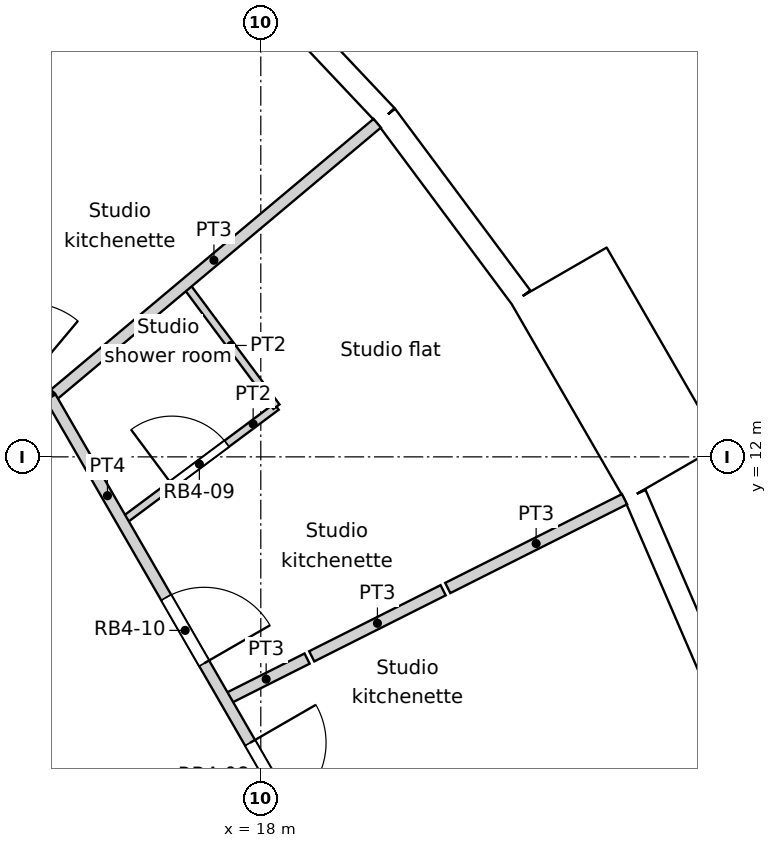
"""IFC4 building model, lengths in metres.
Left out: names, types, materials, properties, quantities, classifications, styles, units other than length and angle.
Written with IfcOpenShell. Run it as: python <this file> out.ifc"""

import sys

from ifc_helpers import new_model, si_unit, direction, frame, frame_2d, origin, origin_2d, place, context, subcontext, project, spatial, rectangle, circle, extrude, element, fill, save


model = new_model("IFC4")
c1 = context("Model", 3, precision=1e-05, world=origin(), true_north=direction((0.0, 1.0)))
c2 = subcontext(c1, "Body", "Model", "MODEL_VIEW")
j1 = project(units=[si_unit("LENGTHUNIT", "METRE"), si_unit("PLANEANGLEUNIT", "RADIAN")], contexts=[c1])
p1 = place(None, origin())
s1 = spatial("IfcSite", under=j1, at=p1, CompositionType="ELEMENT")
p2 = place(p1, origin())
s2 = spatial("IfcBuilding", under=s1, at=p2, CompositionType="ELEMENT")
p3 = place(p2, frame((0.0, 0.0, 158.4)))
s3 = spatial("IfcBuildingStorey", under=s2, at=p3, CompositionType="ELEMENT", Elevation=158.4)
for number, where, z_axis, x_axis in (
    (1, (21.937, 11.017, 0.0), (0.0, 0.0, 1.0), (1.0, 0.0, 0.0)),
    (2, (18.805, 15.779, 0.0), (0.0, 0.0, 1.0), (1.0, 0.0, 0.0)),
):
    element("IfcColumn", number, at=place(p3, frame(where, z_axis=z_axis, x_axis=x_axis)), inside=s3, PredefinedType="COLUMN", context=c2, shape_type="SweptSolid", body=[
        extrude(circle(Radius=0.6, at=origin_2d()), origin(), (0.0, 0.0, 1.0), 3.6),
    ])
p4 = place(p3, frame((15.552, 10.603, 0.0), z_axis=(0.0, 0.0, 1.0), x_axis=(1.0, 0.0, 0.0)))
e3 = element("IfcColumn", 3, at=p4, inside=s3, PredefinedType="COLUMN", context=c2, shape_type="SweptSolid", body=[
    extrude(circle(Radius=0.65, at=origin_2d()), origin(), (0.0, 0.0, 1.0), 3.6),
])
p5 = place(p3, frame((24.101, 8.772, 0.0), z_axis=(0.0, 0.0, 1.0), x_axis=(-0.396148129016, 0.918186614952, 0.0)))
e4 = element("IfcWall", 4, at=p5, inside=s3, PredefinedType="SOLIDWALL", context=c2, shape_type="SweptSolid", body=[
    extrude(rectangle(XDim=2.973, YDim=0.3, at=frame_2d((1.486, 0.0))), origin(), (0.0, 0.0, 1.0), 3.3),
])
p6 = place(p5, frame((1.486, 0.0, 1.55)))
e5 = element("IfcOpeningElement", 5, at=p6, cuts=e4, PredefinedType="OPENING", context=c2, shape_type="SweptSolid", body=[
    extrude(circle(Radius=0.9, at=origin_2d()), frame((0.0, 0.16, 0.0), z_axis=(0.0, -1.0, 0.0), x_axis=(1.0, 0.0, 0.0)), (0.0, 0.0, 1.0), 0.32),
])
p7 = place(p3, frame((23.422, 11.791, -0.3), z_axis=(0.0, 0.0, 1.0), x_axis=(-0.499990139034, 0.866031096941, 0.0)))
e6 = element("IfcWall", 6, at=p7, inside=s3, PredefinedType="ELEMENTEDWALL", context=c2, shape_type="SweptSolid", body=[
    extrude(rectangle(XDim=3.0, YDim=1.45, at=frame_2d((1.5, 0.0))), origin(), (0.0, 0.0, 1.0), 3.6),
])
p8 = place(p7, frame((1.5, 0.0, 1.85)))
e7 = element("IfcOpeningElement", 7, at=p8, cuts=e6, PredefinedType="OPENING", context=c2, shape_type="SweptSolid", body=[
    extrude(circle(Radius=0.9, at=origin_2d()), frame((0.0, 0.735, 0.0), z_axis=(0.0, -1.0, 0.0), x_axis=(1.0, 0.0, 0.0)), (0.0, 0.0, 1.0), 1.47),
])
p9 = place(p3, frame((21.422, 14.101, 0.0), z_axis=(0.0, 0.0, 1.0), x_axis=(-0.597197580538, 0.80209416517, 0.0)))
e8 = element("IfcWall", 8, at=p9, inside=s3, PredefinedType="SOLIDWALL", context=c2, shape_type="SweptSolid", body=[
    extrude(rectangle(XDim=2.973, YDim=0.3, at=frame_2d((1.486, 0.0))), origin(), (0.0, 0.0, 1.0), 3.3),
])
p10 = place(p9, frame((1.486, 0.0, 1.55)))
e9 = element("IfcOpeningElement", 9, at=p10, cuts=e8, PredefinedType="OPENING", context=c2, shape_type="SweptSolid", body=[
    extrude(circle(Radius=0.9, at=origin_2d()), frame((0.0, 0.16, 0.0), z_axis=(0.0, -1.0, 0.0), x_axis=(1.0, 0.0, 0.0)), (0.0, 0.0, 1.0), 0.32),
])
p11 = place(p3, frame((19.647, 16.486, 0.0), z_axis=(0.0, 0.0, 1.0), x_axis=(-0.686235184166, 0.727379730273, 0.0)))
e10 = element("IfcWall", 10, at=p11, inside=s3, PredefinedType="SOLIDWALL", context=c2, shape_type="SweptSolid", body=[
    extrude(rectangle(XDim=2.973, YDim=0.3, at=frame_2d((1.486, 0.0))), origin(), (0.0, 0.0, 1.0), 3.3),
])
p12 = place(p11, frame((1.486, 0.0, 1.55)))
e11 = element("IfcOpeningElement", 11, at=p12, cuts=e10, PredefinedType="OPENING", context=c2, shape_type="SweptSolid", body=[
    extrude(circle(Radius=0.9, at=origin_2d()), frame((0.0, 0.16, 0.0), z_axis=(0.0, -1.0, 0.0), x_axis=(1.0, 0.0, 0.0)), (0.0, 0.0, 1.0), 0.32),
])
p13 = place(p3, frame((15.235, 12.784, 0.0), z_axis=(0.0, 0.0, 1.0), x_axis=(0.499940714931, -0.86605962933, 0.0)))
e12 = element("IfcWall", 12, at=p13, inside=s3, PredefinedType="PARTITIONING", context=c2, shape_type="SweptSolid", body=[
    extrude(rectangle(XDim=6.907, YDim=0.15, at=frame_2d((3.454, 0.0))), origin(), (0.0, 0.0, 1.0), 3.3),
])
p14 = place(p13, frame((5.249, 0.0, 0.0)))
e13 = element("IfcOpeningElement", 13, at=p14, cuts=e12, PredefinedType="OPENING", context=c2, shape_type="SweptSolid", body=[
    extrude(rectangle(XDim=1.0, YDim=2.1, at=frame_2d((0.5, 1.05))), frame((0.0, 0.075, 0.0), z_axis=(0.0, -1.0, 0.0), x_axis=(1.0, 0.0, 0.0)), (0.0, 0.0, 1.0), 0.15),
])
p15 = place(p13, frame((3.041, 0.0, 0.0)))
e14 = element("IfcOpeningElement", 14, at=p15, cuts=e12, PredefinedType="OPENING", context=c2, shape_type="SweptSolid", body=[
    extrude(rectangle(XDim=1.0, YDim=2.1, at=frame_2d((0.5, 1.05))), frame((0.0, 0.075, 0.0), z_axis=(0.0, -1.0, 0.0), x_axis=(1.0, 0.0, 0.0)), (0.0, 0.0, 1.0), 0.15),
])
p16 = place(p3, frame((9.943, 17.222, 0.0), z_axis=(0.0, 0.0, 1.0), x_axis=(0.766192104565, -0.642611592567, 0.0)))
e15 = element("IfcWall", 15, at=p16, inside=s3, PredefinedType="PARTITIONING", context=c2, shape_type="SweptSolid", body=[
    extrude(rectangle(XDim=6.906, YDim=0.15, at=frame_2d((3.453, 0.0))), origin(), (0.0, 0.0, 1.0), 3.3),
])
p17 = place(p16, frame((5.537, 0.0, 0.0)))
e16 = element("IfcOpeningElement", 16, at=p17, cuts=e15, PredefinedType="OPENING", context=c2, shape_type="SweptSolid", body=[
    extrude(rectangle(XDim=1.0, YDim=2.1, at=frame_2d((0.5, 1.05))), frame((0.0, 0.075, 0.0), z_axis=(0.0, -1.0, 0.0), x_axis=(1.0, 0.0, 0.0)), (0.0, 0.0, 1.0), 0.15),
])
p18 = place(p3, frame((17.532, 8.805, 0.0), z_axis=(0.0, 0.0, 1.0), x_axis=(0.893574741649, 0.448914447403, 0.0)))
e17 = element("IfcWall", 17, at=p18, inside=s3, PredefinedType="PARTITIONING", context=c2, shape_type="SweptSolid", body=[
    extrude(rectangle(XDim=1.205, YDim=0.15, at=frame_2d((0.603, 0.0))), origin(), (0.0, 0.0, 1.0), 3.3),
])
p19 = place(p3, frame((20.46, 10.275, 0.0), z_axis=(0.0, 0.0, 1.0), x_axis=(0.893543449143, 0.448976730458, 0.0)))
e18 = element("IfcWall", 18, at=p19, inside=s3, PredefinedType="PARTITIONING", context=c2, shape_type="SweptSolid", body=[
    extrude(rectangle(XDim=2.602, YDim=0.15, at=frame_2d((1.301, 0.0))), origin(), (0.0, 0.0, 1.0), 3.3),
])
p20 = place(p3, frame((18.67, 9.376, 0.0), z_axis=(0.0, 0.0, 1.0), x_axis=(0.893466318026, 0.449130202227, 0.0)))
e19 = element("IfcWall", 19, at=p20, inside=s3, PredefinedType="PARTITIONING", context=c2, shape_type="SweptSolid", body=[
    extrude(rectangle(XDim=1.935, YDim=0.15, at=frame_2d((0.968, 0.0))), origin(), (0.0, 0.0, 1.0), 3.3),
])
p21 = place(p3, frame((16.178, 11.15, 0.0), z_axis=(0.0, 0.0, 1.0), x_axis=(0.8020923136, 0.597200067367, 0.0)))
e20 = element("IfcWall", 20, at=p21, inside=s3, PredefinedType="PARTITIONING", context=c2, shape_type="SweptSolid", body=[
    extrude(rectangle(XDim=2.529, YDim=0.1, at=frame_2d((1.264, 0.0))), origin(), (0.0, 0.0, 1.0), 3.3),
])
p22 = place(p21, frame((0.814, 0.0, 0.0)))
e21 = element("IfcOpeningElement", 21, at=p22, cuts=e20, PredefinedType="OPENING", context=c2, shape_type="SweptSolid", body=[
    extrude(rectangle(XDim=0.9, YDim=2.04, at=frame_2d((0.45, 1.02))), frame((0.0, 0.05, 0.0), z_axis=(0.0, -1.0, 0.0), x_axis=(1.0, 0.0, 0.0)), (0.0, 0.0, 1.0), 0.1),
])
p23 = place(p3, frame((17.007, 14.271, 0.0), z_axis=(0.0, 0.0, 1.0), x_axis=(0.597019866774, -0.802226450996, 0.0)))
e22 = element("IfcWall", 22, at=p23, inside=s3, PredefinedType="PARTITIONING", context=c2, shape_type="SweptSolid", body=[
    extrude(rectangle(XDim=2.008, YDim=0.1, at=frame_2d((1.004, 0.0))), origin(), (0.0, 0.0, 1.0), 3.3),
])
p24 = place(p3, frame((15.235, 12.784, 0.0), z_axis=(0.0, 0.0, 1.0), x_axis=(0.766069165353, 0.642758145725, 0.0)))
e23 = element("IfcWall", 23, at=p24, inside=s3, PredefinedType="PARTITIONING", context=c2, shape_type="SweptSolid", body=[
    extrude(rectangle(XDim=5.609, YDim=0.15, at=frame_2d((2.804, 0.0))), origin(), (0.0, 0.0, 1.0), 3.3),
])
p25 = place(p6, origin())
e24 = element("IfcWindow", 24, at=p25, inside=s3, PartitioningType="SINGLE_PANEL", PredefinedType="WINDOW", context=c2, shape_type="SweptSolid", body=[
    extrude(circle(Radius=0.9, at=origin_2d()), frame((0.0, 0.12, 0.0), z_axis=(0.0, -1.0, 0.0), x_axis=(1.0, 0.0, 0.0)), (0.0, 0.0, 1.0), 0.1),
])
fill(e5, e24)
p26 = place(p8, origin())
e25 = element("IfcWindow", 25, at=p26, inside=s3, PartitioningType="SINGLE_PANEL", PredefinedType="WINDOW", context=c2, shape_type="SweptSolid", body=[
    extrude(circle(Radius=0.9, at=origin_2d()), frame((0.0, 0.695, 0.0), z_axis=(0.0, -1.0, 0.0), x_axis=(1.0, 0.0, 0.0)), (0.0, 0.0, 1.0), 0.1),
])
fill(e7, e25)
p27 = place(p10, origin())
e26 = element("IfcWindow", 26, at=p27, inside=s3, PartitioningType="SINGLE_PANEL", PredefinedType="WINDOW", context=c2, shape_type="SweptSolid", body=[
    extrude(circle(Radius=0.9, at=origin_2d()), frame((0.0, 0.12, 0.0), z_axis=(0.0, -1.0, 0.0), x_axis=(1.0, 0.0, 0.0)), (0.0, 0.0, 1.0), 0.1),
])
fill(e9, e26)
p28 = place(p12, origin())
e27 = element("IfcWindow", 27, at=p28, inside=s3, PartitioningType="SINGLE_PANEL", PredefinedType="WINDOW", context=c2, shape_type="SweptSolid", body=[
    extrude(circle(Radius=0.9, at=origin_2d()), frame((0.0, 0.12, 0.0), z_axis=(0.0, -1.0, 0.0), x_axis=(1.0, 0.0, 0.0)), (0.0, 0.0, 1.0), 0.1),
])
fill(e11, e27)
p29 = place(p14, origin())
e28 = element("IfcDoor", 28, at=p29, inside=s3, OperationType="SINGLE_SWING_LEFT", PredefinedType="DOOR", context=c2, shape_type="SweptSolid", body=[
    extrude(rectangle(XDim=1.0, YDim=2.1, at=frame_2d((0.5, 1.05))), frame((0.0, 0.025, 0.0), z_axis=(0.0, -1.0, 0.0), x_axis=(1.0, 0.0, 0.0)), (0.0, 0.0, 1.0), 0.05),
])
fill(e13, e28)
p30 = place(p22, origin())
e29 = element("IfcDoor", 29, at=p30, inside=s3, OperationType="SINGLE_SWING_LEFT", PredefinedType="DOOR", context=c2, shape_type="SweptSolid", body=[
    extrude(rectangle(XDim=0.9, YDim=2.04, at=frame_2d((0.45, 1.02))), frame((0.0, 0.025, 0.0), z_axis=(0.0, -1.0, 0.0), x_axis=(1.0, 0.0, 0.0)), (0.0, 0.0, 1.0), 0.05),
])
fill(e21, e29)
p31 = place(p15, origin())
e30 = element("IfcDoor", 30, at=p31, inside=s3, OperationType="SINGLE_SWING_RIGHT", PredefinedType="DOOR", context=c2, shape_type="SweptSolid", body=[
    extrude(rectangle(XDim=1.0, YDim=2.1, at=frame_2d((0.5, 1.05))), frame((0.0, 0.025, 0.0), z_axis=(0.0, -1.0, 0.0), x_axis=(1.0, 0.0, 0.0)), (0.0, 0.0, 1.0), 0.05),
])
fill(e14, e30)
save(model, sys.argv[1])
